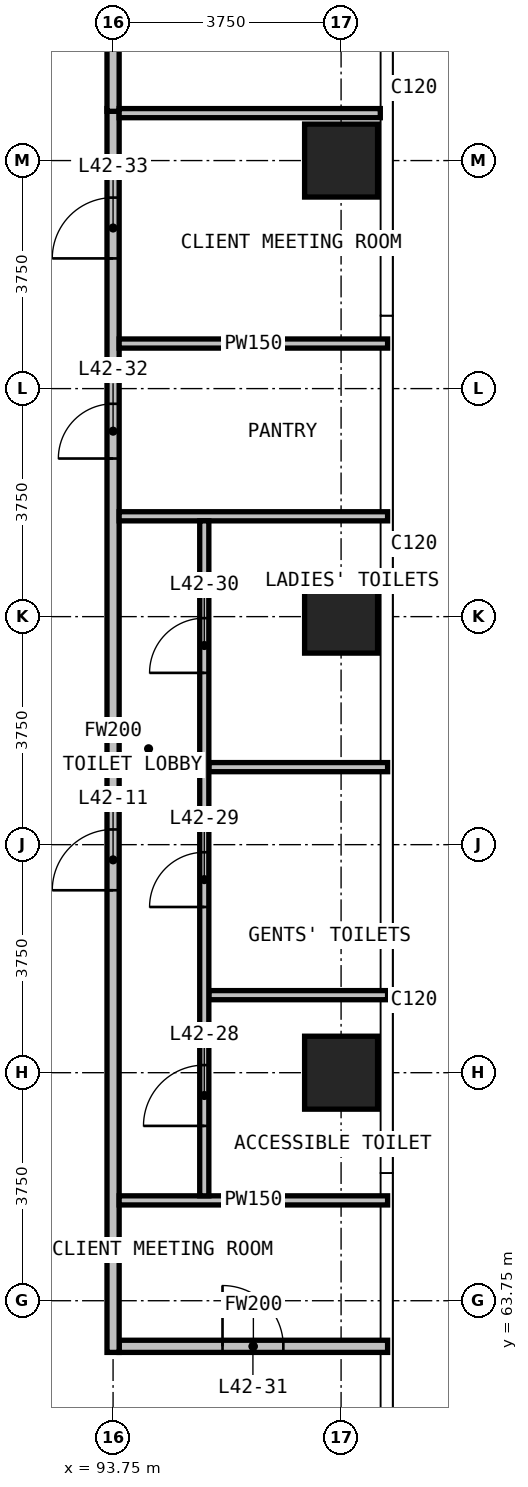
"""IFC4 building model, lengths in metres.
Left out: names, types, materials, properties, quantities, classifications, styles, units other than length and angle.
Written with IfcOpenShell. Run it as: python <this file> out.ifc"""

import sys

from ifc_helpers import new_model, si_unit, direction, frame, frame_2d, origin, origin_2d, place, context, subcontext, project, spatial, rectangle, extrude, element, fill, save


model = new_model("IFC4")
c1 = context("Model", 3, precision=1e-05, world=origin(), true_north=direction((0.0, 1.0)))
c2 = subcontext(c1, "Body", "Model", "MODEL_VIEW")
j1 = project(units=[si_unit("LENGTHUNIT", "METRE"), si_unit("PLANEANGLEUNIT", "RADIAN")], contexts=[c1])
p1 = place(None, origin())
s1 = spatial("IfcSite", under=j1, at=p1, CompositionType="ELEMENT")
p2 = place(p1, origin())
s2 = spatial("IfcBuilding", under=s1, at=p2, CompositionType="ELEMENT")
p3 = place(p2, frame((0.0, 0.0, 165.7)))
s3 = spatial("IfcBuildingStorey", under=s2, at=p3, CompositionType="ELEMENT", Elevation=165.7)
for number, where, z_axis, x_axis in (
    (1, (97.5, 67.5, 0.0), (0.0, 0.0, 1.0), (1.0, 0.0, 0.0)),
    (2, (97.5, 75.0, 0.0), (0.0, 0.0, 1.0), (1.0, 0.0, 0.0)),
    (3, (97.5, 82.5, 0.0), (0.0, 0.0, 1.0), (1.0, 0.0, 0.0)),
):
    element("IfcColumn", number, at=place(p3, frame(where, z_axis=z_axis, x_axis=x_axis)), inside=s3, PredefinedType="COLUMN", context=c2, shape_type="SweptSolid", body=[
        extrude(rectangle(XDim=1.2, YDim=1.2, at=origin_2d()), origin(), (0.0, 0.0, 1.0), 3.6),
    ])
p4 = place(p3, frame((93.85, 63.0, 0.0), z_axis=(0.0, 0.0, 1.0), x_axis=(1.0, 0.0, 0.0)))
e4 = element("IfcWall", 4, at=p4, inside=s3, PredefinedType="PARTITIONING", context=c2, shape_type="SweptSolid", body=[
    extrude(rectangle(XDim=4.415, YDim=0.2, at=frame_2d((2.208, 0.0))), origin(), (0.0, 0.0, 1.0), 3.3),
])
p5 = place(p4, frame((1.7, 0.0, 0.0)))
e5 = element("IfcOpeningElement", 5, at=p5, cuts=e4, PredefinedType="OPENING", context=c2, shape_type="SweptSolid", body=[
    extrude(rectangle(XDim=1.0, YDim=2.2, at=frame_2d((0.5, 1.1))), frame((0.0, 0.11, 0.0), z_axis=(0.0, -1.0, 0.0), x_axis=(1.0, 0.0, 0.0)), (0.0, 0.0, 1.0), 0.22),
])
p6 = place(p3, frame((93.75, 62.9, 0.0), z_axis=(0.0, 0.0, 1.0), x_axis=(0.0, 1.0, 0.0)))
e6 = element("IfcWall", 6, at=p6, inside=s3, PredefinedType="PARTITIONING", context=c2, shape_type="SweptSolid", body=[
    extrude(rectangle(XDim=20.455, YDim=0.2, at=frame_2d((10.228, 0.0))), origin(), (0.0, 0.0, 1.0), 3.3),
])
p7 = place(p6, frame((7.6, 0.0, 0.0)))
e7 = element("IfcOpeningElement", 7, at=p7, cuts=e6, PredefinedType="OPENING", context=c2, shape_type="SweptSolid", body=[
    extrude(rectangle(XDim=1.0, YDim=2.2, at=frame_2d((0.5, 1.1))), frame((0.0, 0.11, 0.0), z_axis=(0.0, -1.0, 0.0), x_axis=(1.0, 0.0, 0.0)), (0.0, 0.0, 1.0), 0.22),
])
p8 = place(p6, frame((14.7, 0.0, 0.0)))
e8 = element("IfcOpeningElement", 8, at=p8, cuts=e6, PredefinedType="OPENING", context=c2, shape_type="SweptSolid", body=[
    extrude(rectangle(XDim=0.9, YDim=2.2, at=frame_2d((0.45, 1.1))), frame((0.0, 0.11, 0.0), z_axis=(0.0, -1.0, 0.0), x_axis=(1.0, 0.0, 0.0)), (0.0, 0.0, 1.0), 0.22),
])
p9 = place(p6, frame((17.991, 0.0, 0.0)))
e9 = element("IfcOpeningElement", 9, at=p9, cuts=e6, PredefinedType="OPENING", context=c2, shape_type="SweptSolid", body=[
    extrude(rectangle(XDim=1.0, YDim=2.2, at=frame_2d((0.5, 1.1))), frame((0.0, 0.11, 0.0), z_axis=(0.0, -1.0, 0.0), x_axis=(1.0, 0.0, 0.0)), (0.0, 0.0, 1.0), 0.22),
])
p10 = place(p3, frame((93.75, 83.31, 0.0), z_axis=(0.0, 0.0, 1.0), x_axis=(0.0, 1.0, 0.0)))
e10 = element("IfcWall", 10, at=p10, inside=s3, PredefinedType="PARTITIONING", context=c2, shape_type="SweptSolid", body=[
    extrude(rectangle(XDim=7.335, YDim=0.2, at=frame_2d((3.667, 0.0))), origin(), (0.0, 0.0, 1.0), 3.3),
])
p11 = place(p3, frame((93.85, 65.4, 0.0), z_axis=(0.0, 0.0, 1.0), x_axis=(1.0, 0.0, 0.0)))
e11 = element("IfcWall", 11, at=p11, inside=s3, PredefinedType="PARTITIONING", context=c2, shape_type="SweptSolid", body=[
    extrude(rectangle(XDim=4.415, YDim=0.15, at=frame_2d((2.208, 0.0))), origin(), (0.0, 0.0, 1.0), 3.3),
])
for number, where, z_axis, x_axis in (
    (12, (95.325, 68.775, 0.0), (0.0, 0.0, 1.0), (1.0, 0.0, 0.0)),
    (13, (95.325, 72.525, 0.0), (0.0, 0.0, 1.0), (1.0, 0.0, 0.0)),
):
    element("IfcWall", number, at=place(p3, frame(where, z_axis=z_axis, x_axis=x_axis)), inside=s3, PredefinedType="PARTITIONING", context=c2, shape_type="SweptSolid", body=[
        extrude(rectangle(XDim=2.94, YDim=0.15, at=frame_2d((1.47, 0.0))), origin(), (0.0, 0.0, 1.0), 3.3),
    ])
for number, where, z_axis, x_axis in (
    (14, (93.85, 76.65, 0.0), (0.0, 0.0, 1.0), (1.0, 0.0, 0.0)),
    (15, (93.85, 79.491, 0.0), (0.0, 0.0, 1.0), (1.0, 0.0, 0.0)),
):
    element("IfcWall", number, at=place(p3, frame(where, z_axis=z_axis, x_axis=x_axis)), inside=s3, PredefinedType="PARTITIONING", context=c2, shape_type="SweptSolid", body=[
        extrude(rectangle(XDim=4.415, YDim=0.15, at=frame_2d((2.208, 0.0))), origin(), (0.0, 0.0, 1.0), 3.3),
    ])
p12 = place(p3, frame((93.85, 83.28, 0.0), z_axis=(0.0, 0.0, 1.0), x_axis=(1.0, 0.0, 0.0)))
e16 = element("IfcWall", 16, at=p12, inside=s3, PredefinedType="PARTITIONING", context=c2, shape_type="SweptSolid", body=[
    extrude(rectangle(XDim=4.295, YDim=0.15, at=frame_2d((2.147, 0.0))), origin(), (0.0, 0.0, 1.0), 3.3),
])
p13 = place(p3, frame((95.25, 65.475, 0.0), z_axis=(0.0, 0.0, 1.0), x_axis=(0.0, 1.0, 0.0)))
e17 = element("IfcWall", 17, at=p13, inside=s3, PredefinedType="PARTITIONING", context=c2, shape_type="SweptSolid", body=[
    extrude(rectangle(XDim=11.1, YDim=0.15, at=frame_2d((5.55, 0.0))), origin(), (0.0, 0.0, 1.0), 3.3),
])
p14 = place(p13, frame((1.15, 0.0, 0.0)))
e18 = element("IfcOpeningElement", 18, at=p14, cuts=e17, PredefinedType="OPENING", context=c2, shape_type="SweptSolid", body=[
    extrude(rectangle(XDim=1.0, YDim=2.2, at=frame_2d((0.5, 1.1))), frame((0.0, 0.085, 0.0), z_axis=(0.0, -1.0, 0.0), x_axis=(1.0, 0.0, 0.0)), (0.0, 0.0, 1.0), 0.17),
])
p15 = place(p13, frame((4.75, 0.0, 0.0)))
e19 = element("IfcOpeningElement", 19, at=p15, cuts=e17, PredefinedType="OPENING", context=c2, shape_type="SweptSolid", body=[
    extrude(rectangle(XDim=0.9, YDim=2.2, at=frame_2d((0.45, 1.1))), frame((0.0, 0.085, 0.0), z_axis=(0.0, -1.0, 0.0), x_axis=(1.0, 0.0, 0.0)), (0.0, 0.0, 1.0), 0.17),
])
p16 = place(p13, frame((8.6, 0.0, 0.0)))
e20 = element("IfcOpeningElement", 20, at=p16, cuts=e17, PredefinedType="OPENING", context=c2, shape_type="SweptSolid", body=[
    extrude(rectangle(XDim=0.9, YDim=2.2, at=frame_2d((0.45, 1.1))), frame((0.0, 0.085, 0.0), z_axis=(0.0, -1.0, 0.0), x_axis=(1.0, 0.0, 0.0)), (0.0, 0.0, 1.0), 0.17),
])
p17 = place(p7, origin())
e21 = element("IfcDoor", 21, at=p17, inside=s3, OperationType="SINGLE_SWING_LEFT", PredefinedType="DOOR", context=c2, shape_type="SweptSolid", body=[
    extrude(rectangle(XDim=1.0, YDim=2.2, at=frame_2d((0.5, 1.1))), frame((0.0, 0.025, 0.0), z_axis=(0.0, -1.0, 0.0), x_axis=(1.0, 0.0, 0.0)), (0.0, 0.0, 1.0), 0.05),
])
fill(e7, e21)
p18 = place(p14, origin())
e22 = element("IfcDoor", 22, at=p18, inside=s3, OperationType="SINGLE_SWING_LEFT", PredefinedType="DOOR", context=c2, shape_type="SweptSolid", body=[
    extrude(rectangle(XDim=1.0, YDim=2.2, at=frame_2d((0.5, 1.1))), frame((0.0, 0.025, 0.0), z_axis=(0.0, -1.0, 0.0), x_axis=(1.0, 0.0, 0.0)), (0.0, 0.0, 1.0), 0.05),
])
fill(e18, e22)
p19 = place(p15, origin())
e23 = element("IfcDoor", 23, at=p19, inside=s3, OperationType="SINGLE_SWING_LEFT", PredefinedType="DOOR", context=c2, shape_type="SweptSolid", body=[
    extrude(rectangle(XDim=0.9, YDim=2.2, at=frame_2d((0.45, 1.1))), frame((0.0, 0.025, 0.0), z_axis=(0.0, -1.0, 0.0), x_axis=(1.0, 0.0, 0.0)), (0.0, 0.0, 1.0), 0.05),
])
fill(e19, e23)
p20 = place(p16, origin())
e24 = element("IfcDoor", 24, at=p20, inside=s3, OperationType="SINGLE_SWING_LEFT", PredefinedType="DOOR", context=c2, shape_type="SweptSolid", body=[
    extrude(rectangle(XDim=0.9, YDim=2.2, at=frame_2d((0.45, 1.1))), frame((0.0, 0.025, 0.0), z_axis=(0.0, -1.0, 0.0), x_axis=(1.0, 0.0, 0.0)), (0.0, 0.0, 1.0), 0.05),
])
fill(e20, e24)
p21 = place(p5, origin())
e25 = element("IfcDoor", 25, at=p21, inside=s3, OperationType="SINGLE_SWING_LEFT", PredefinedType="DOOR", context=c2, shape_type="SweptSolid", body=[
    extrude(rectangle(XDim=1.0, YDim=2.2, at=frame_2d((0.5, 1.1))), frame((0.0, 0.025, 0.0), z_axis=(0.0, -1.0, 0.0), x_axis=(1.0, 0.0, 0.0)), (0.0, 0.0, 1.0), 0.05),
])
fill(e5, e25)
p22 = place(p8, origin())
e26 = element("IfcDoor", 26, at=p22, inside=s3, OperationType="SINGLE_SWING_LEFT", PredefinedType="DOOR", context=c2, shape_type="SweptSolid", body=[
    extrude(rectangle(XDim=0.9, YDim=2.2, at=frame_2d((0.45, 1.1))), frame((0.0, 0.025, 0.0), z_axis=(0.0, -1.0, 0.0), x_axis=(1.0, 0.0, 0.0)), (0.0, 0.0, 1.0), 0.05),
])
fill(e8, e26)
p23 = place(p9, origin())
e27 = element("IfcDoor", 27, at=p23, inside=s3, OperationType="SINGLE_SWING_LEFT", PredefinedType="DOOR", context=c2, shape_type="SweptSolid", body=[
    extrude(rectangle(XDim=1.0, YDim=2.2, at=frame_2d((0.5, 1.1))), frame((0.0, 0.025, 0.0), z_axis=(0.0, -1.0, 0.0), x_axis=(1.0, 0.0, 0.0)), (0.0, 0.0, 1.0), 0.05),
])
fill(e9, e27)
save(model, sys.argv[1])
